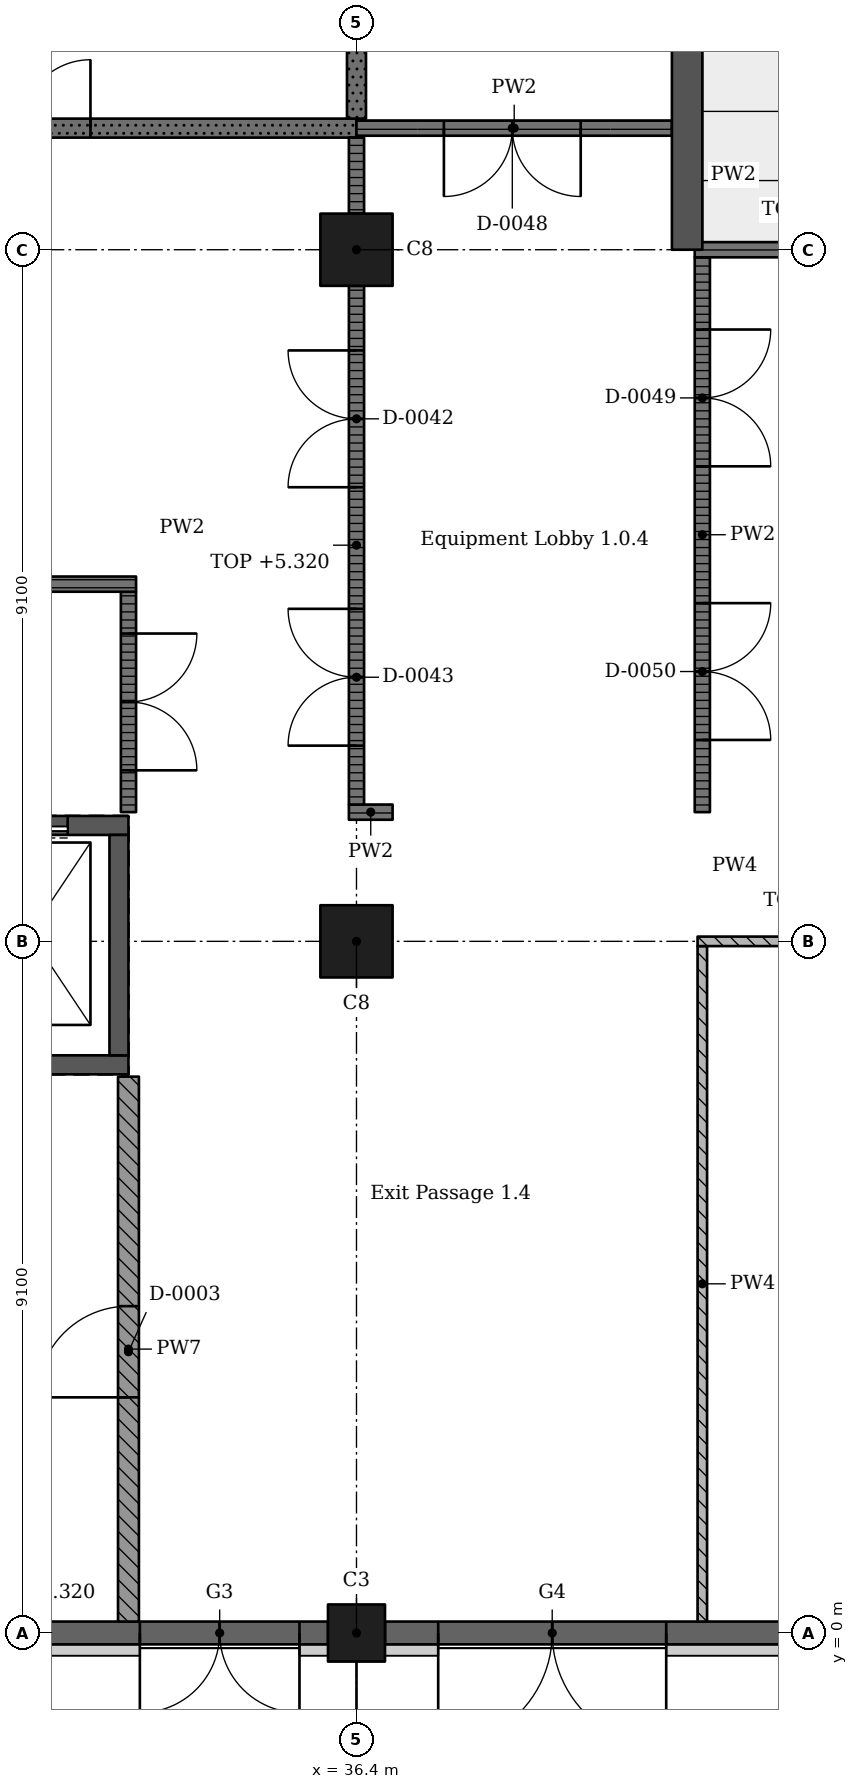
"""IFC4 building model, lengths in metres.
Left out: names, types, materials, properties, quantities, classifications, styles, units other than length and angle.
Written with IfcOpenShell. Run it as: python <this file> out.ifc"""

import sys

from ifc_helpers import new_model, si_unit, direction, frame, frame_2d, origin, origin_2d, place, context, subcontext, project, spatial, rectangle, extrude, element, fill, save


model = new_model("IFC4")
c1 = context("Model", 3, precision=1e-05, world=origin(), true_north=direction((0.0, 1.0)))
c2 = subcontext(c1, "Body", "Model", "MODEL_VIEW")
j1 = project(units=[si_unit("LENGTHUNIT", "METRE"), si_unit("PLANEANGLEUNIT", "RADIAN")], contexts=[c1])
p1 = place(None, origin())
s1 = spatial("IfcSite", under=j1, at=p1, CompositionType="ELEMENT")
p2 = place(p1, origin())
s2 = spatial("IfcBuilding", under=s1, at=p2, CompositionType="ELEMENT")
p3 = place(p2, origin())
s3 = spatial("IfcBuildingStorey", under=s2, at=p3, CompositionType="ELEMENT", Elevation=0.0)
p4 = place(p3, frame((36.4, 0.0, -0.4), z_axis=(0.0, 0.0, 1.0), x_axis=(1.0, 0.0, 0.0)))
e1 = element("IfcColumn", 1, at=p4, inside=s3, PredefinedType="COLUMN", context=c2, shape_type="SweptSolid", body=[
    extrude(rectangle(XDim=0.75, YDim=0.75, at=origin_2d()), origin(), (0.0, 0.0, 1.0), 6.77),
])
for number, where, z_axis, x_axis in (
    (2, (36.4, 9.1, -0.4), (0.0, 0.0, 1.0), (1.0, 0.0, 0.0)),
    (3, (36.4, 18.2, -0.4), (0.0, 0.0, 1.0), (1.0, 0.0, 0.0)),
):
    element("IfcColumn", number, at=place(p3, frame(where, z_axis=z_axis, x_axis=x_axis)), inside=s3, PredefinedType="COLUMN", context=c2, shape_type="SweptSolid", body=[
        extrude(rectangle(XDim=0.95, YDim=0.95, at=origin_2d()), origin(), (0.0, 0.0, 1.0), 6.77),
    ])
p5 = place(p3, frame((40.75, 26.809, -0.4), z_axis=(0.0, 0.0, 1.0), x_axis=(0.0, -1.0, 0.0)))
e4 = element("IfcWall", 4, at=p5, inside=s3, PredefinedType="SHEAR", context=c2, shape_type="SweptSolid", body=[
    extrude(rectangle(XDim=8.609, YDim=0.4, at=frame_2d((4.304, 0.0))), origin(), (0.0, 0.0, 1.0), 6.77),
])
p6 = place(p3, frame((33.4, 7.475, -1.4), z_axis=(0.0, 0.0, 1.0), x_axis=(-1.0, 0.0, 0.0)))
e5 = element("IfcWall", 5, at=p6, inside=s3, PredefinedType="SHEAR", context=c2, shape_type="SweptSolid", body=[
    extrude(rectangle(XDim=2.6, YDim=0.25, at=frame_2d((1.3, 0.0))), origin(), (0.0, 0.0, 1.0), 7.77),
])
p7 = place(p3, frame((33.4, 10.625, -1.4), z_axis=(0.0, 0.0, 1.0), x_axis=(-1.0, 0.0, 0.0)))
e6 = element("IfcWall", 6, at=p7, inside=s3, PredefinedType="SHEAR", context=c2, shape_type="SweptSolid", body=[
    extrude(rectangle(XDim=2.6, YDim=0.25, at=frame_2d((1.3, 0.0))), origin(), (0.0, 0.0, 1.0), 7.77),
])
p8 = place(p7, frame((0.8, 0.0, 1.4)))
e7 = element("IfcOpeningElement", 7, at=p8, cuts=e6, PredefinedType="OPENING", context=c2, shape_type="SweptSolid", body=[
    extrude(rectangle(XDim=1.0, YDim=2.1, at=frame_2d((0.5, 1.05))), frame((0.0, 0.135, 0.0), z_axis=(0.0, -1.0, 0.0), x_axis=(1.0, 0.0, 0.0)), (0.0, 0.0, 1.0), 0.27),
])
p9 = place(p3, frame((33.275, 10.5, -1.4), z_axis=(0.0, 0.0, 1.0), x_axis=(0.0, -1.0, 0.0)))
e8 = element("IfcWall", 8, at=p9, inside=s3, PredefinedType="SHEAR", context=c2, shape_type="SweptSolid", body=[
    extrude(rectangle(XDim=2.9, YDim=0.25, at=frame_2d((1.45, 0.0))), origin(), (0.0, 0.0, 1.0), 7.77),
])
p10 = place(p3, frame((27.65, 0.0, 0.0), z_axis=(0.0, 0.0, 1.0), x_axis=(1.0, 0.0, 0.0)))
e9 = element("IfcWall", 9, at=p10, inside=s3, PredefinedType="SOLIDWALL", context=c2, shape_type="SweptSolid", body=[
    extrude(rectangle(XDim=8.375, YDim=0.3, at=frame_2d((4.188, 0.0))), origin(), (0.0, 0.0, 1.0), 5.32),
])
p11 = place(p10, frame((5.9, 0.0, 0.0)))
e10 = element("IfcOpeningElement", 10, at=p11, cuts=e9, PredefinedType="OPENING", context=c2, shape_type="SweptSolid", body=[
    extrude(rectangle(XDim=2.1, YDim=2.4, at=frame_2d((1.05, 1.2))), frame((0.0, 0.16, 0.0), z_axis=(0.0, -1.0, 0.0), x_axis=(1.0, 0.0, 0.0)), (0.0, 0.0, 1.0), 0.32),
])
p12 = place(p3, frame((36.775, 0.0, 0.0), z_axis=(0.0, 0.0, 1.0), x_axis=(1.0, 0.0, 0.0)))
e11 = element("IfcWall", 11, at=p12, inside=s3, PredefinedType="SOLIDWALL", context=c2, shape_type="SweptSolid", body=[
    extrude(rectangle(XDim=8.375, YDim=0.3, at=frame_2d((4.188, 0.0))), origin(), (0.0, 0.0, 1.0), 5.32),
])
p13 = place(p12, frame((0.7, 0.0, 0.0)))
e12 = element("IfcOpeningElement", 12, at=p13, cuts=e11, PredefinedType="OPENING", context=c2, shape_type="SweptSolid", body=[
    extrude(rectangle(XDim=3.0, YDim=2.4, at=frame_2d((1.5, 1.2))), frame((0.0, 0.16, 0.0), z_axis=(0.0, -1.0, 0.0), x_axis=(1.0, 0.0, 0.0)), (0.0, 0.0, 1.0), 0.32),
])
p14 = place(p3, frame((27.65, 19.8, 0.0), z_axis=(0.0, 0.0, 1.0), x_axis=(1.0, 0.0, 0.0)))
e13 = element("IfcWall", 13, at=p14, inside=s3, PredefinedType="SOLIDWALL", context=c2, shape_type="SweptSolid", body=[
    extrude(rectangle(XDim=8.75, YDim=0.25, at=frame_2d((4.375, 0.0))), origin(), (0.0, 0.0, 1.0), 6.02),
])
p15 = place(p14, frame((3.45, 0.0, 0.0)))
e14 = element("IfcOpeningElement", 14, at=p15, cuts=e13, PredefinedType="OPENING", context=c2, shape_type="SweptSolid", body=[
    extrude(rectangle(XDim=1.8, YDim=2.1, at=frame_2d((0.9, 1.05))), frame((0.0, 0.135, 0.0), z_axis=(0.0, -1.0, 0.0), x_axis=(1.0, 0.0, 0.0)), (0.0, 0.0, 1.0), 0.27),
])
p16 = place(p3, frame((33.4, 0.15, 0.0), z_axis=(0.0, 0.0, 1.0), x_axis=(0.0, 1.0, 0.0)))
e15 = element("IfcWall", 15, at=p16, inside=s3, PredefinedType="SOLIDWALL", context=c2, shape_type="SweptSolid", body=[
    extrude(rectangle(XDim=7.17, YDim=0.275, at=frame_2d((3.585, 0.0))), origin(), (0.0, 0.0, 1.0), 6.02),
])
p17 = place(p16, frame((2.95, 0.0, 0.0)))
e16 = element("IfcOpeningElement", 16, at=p17, cuts=e15, PredefinedType="OPENING", context=c2, shape_type="SweptSolid", body=[
    extrude(rectangle(XDim=1.2, YDim=2.4, at=frame_2d((0.6, 1.2))), frame((0.0, 0.147, 0.0), z_axis=(0.0, -1.0, 0.0), x_axis=(1.0, 0.0, 0.0)), (0.0, 0.0, 1.0), 0.295),
])
p18 = place(p3, frame((33.4, 10.8, 0.0), z_axis=(0.0, 0.0, 1.0), x_axis=(0.0, 1.0, 0.0)))
e17 = element("IfcWall", 17, at=p18, inside=s3, PredefinedType="PARTITIONING", context=c2, shape_type="SweptSolid", body=[
    extrude(rectangle(XDim=2.9, YDim=0.2, at=frame_2d((1.45, 0.0))), origin(), (0.0, 0.0, 1.0), 6.02),
])
p19 = place(p18, frame((0.55, 0.0, 0.0)))
e18 = element("IfcOpeningElement", 18, at=p19, cuts=e17, PredefinedType="OPENING", context=c2, shape_type="SweptSolid", body=[
    extrude(rectangle(XDim=1.8, YDim=2.4, at=frame_2d((0.9, 1.2))), frame((0.0, 0.11, 0.0), z_axis=(0.0, -1.0, 0.0), x_axis=(1.0, 0.0, 0.0)), (0.0, 0.0, 1.0), 0.22),
])
p20 = place(p3, frame((33.5, 13.8, 0.0), z_axis=(0.0, 0.0, 1.0), x_axis=(-1.0, 0.0, 0.0)))
e19 = element("IfcWall", 19, at=p20, inside=s3, PredefinedType="PARTITIONING", context=c2, shape_type="SweptSolid", body=[
    extrude(rectangle(XDim=5.5, YDim=0.2, at=frame_2d((2.75, 0.0))), origin(), (0.0, 0.0, 1.0), 6.02),
])
p21 = place(p20, frame((1.85, 0.0, 0.0)))
e20 = element("IfcOpeningElement", 20, at=p21, cuts=e19, PredefinedType="OPENING", context=c2, shape_type="SweptSolid", body=[
    extrude(rectangle(XDim=1.8, YDim=2.4, at=frame_2d((0.9, 1.2))), frame((0.0, 0.11, 0.0), z_axis=(0.0, -1.0, 0.0), x_axis=(1.0, 0.0, 0.0)), (0.0, 0.0, 1.0), 0.22),
])
p22 = place(p3, frame((36.3, 10.8, 0.0), z_axis=(0.0, 0.0, 1.0), x_axis=(1.0, 0.0, 0.0)))
e21 = element("IfcWall", 21, at=p22, inside=s3, PredefinedType="PARTITIONING", context=c2, shape_type="SweptSolid", body=[
    extrude(rectangle(XDim=0.575, YDim=0.2, at=frame_2d((0.288, 0.0))), origin(), (0.0, 0.0, 1.0), 6.02),
])
p23 = place(p3, frame((36.4, 17.725, 0.0), z_axis=(0.0, 0.0, 1.0), x_axis=(0.0, -1.0, 0.0)))
e22 = element("IfcWall", 22, at=p23, inside=s3, PredefinedType="PARTITIONING", context=c2, shape_type="SweptSolid", body=[
    extrude(rectangle(XDim=6.825, YDim=0.2, at=frame_2d((3.413, 0.0))), origin(), (0.0, 0.0, 1.0), 5.32),
])
p24 = place(p23, frame((0.85, 0.0, 0.0)))
e23 = element("IfcOpeningElement", 23, at=p24, cuts=e22, PredefinedType="OPENING", context=c2, shape_type="SweptSolid", body=[
    extrude(rectangle(XDim=1.8, YDim=2.4, at=frame_2d((0.9, 1.2))), frame((0.0, 0.11, 0.0), z_axis=(0.0, -1.0, 0.0), x_axis=(1.0, 0.0, 0.0)), (0.0, 0.0, 1.0), 0.22),
])
p25 = place(p23, frame((4.25, 0.0, 0.0)))
e24 = element("IfcOpeningElement", 24, at=p25, cuts=e22, PredefinedType="OPENING", context=c2, shape_type="SweptSolid", body=[
    extrude(rectangle(XDim=1.8, YDim=2.4, at=frame_2d((0.9, 1.2))), frame((0.0, 0.11, 0.0), z_axis=(0.0, -1.0, 0.0), x_axis=(1.0, 0.0, 0.0)), (0.0, 0.0, 1.0), 0.22),
])
p26 = place(p3, frame((36.4, 19.675, 0.0), z_axis=(0.0, 0.0, 1.0), x_axis=(0.0, -1.0, 0.0)))
e25 = element("IfcWall", 25, at=p26, inside=s3, PredefinedType="PARTITIONING", context=c2, shape_type="SweptSolid", body=[
    extrude(rectangle(XDim=1.0, YDim=0.2, at=frame_2d((0.5, 0.0))), origin(), (0.0, 0.0, 1.0), 5.32),
])
p27 = place(p3, frame((36.4, 19.8, 0.0), z_axis=(0.0, 0.0, 1.0), x_axis=(1.0, 0.0, 0.0)))
e26 = element("IfcWall", 26, at=p27, inside=s3, PredefinedType="PARTITIONING", context=c2, shape_type="SweptSolid", body=[
    extrude(rectangle(XDim=4.15, YDim=0.2, at=frame_2d((2.075, 0.0))), origin(), (0.0, 0.0, 1.0), 6.02),
])
p28 = place(p27, frame((1.15, 0.0, 0.0)))
e27 = element("IfcOpeningElement", 27, at=p28, cuts=e26, PredefinedType="OPENING", context=c2, shape_type="SweptSolid", body=[
    extrude(rectangle(XDim=1.8, YDim=2.4, at=frame_2d((0.9, 1.2))), frame((0.0, 0.11, 0.0), z_axis=(0.0, -1.0, 0.0), x_axis=(1.0, 0.0, 0.0)), (0.0, 0.0, 1.0), 0.22),
])
p29 = place(p3, frame((36.4, 26.85, 0.0), z_axis=(0.0, 0.0, 1.0), x_axis=(0.0, -1.0, 0.0)))
e28 = element("IfcWall", 28, at=p29, inside=s3, PredefinedType="SOLIDWALL", context=c2, shape_type="SweptSolid", body=[
    extrude(rectangle(XDim=6.925, YDim=0.25, at=frame_2d((3.462, 0.0))), origin(), (0.0, 0.0, 1.0), 5.32),
])
p30 = place(p3, frame((40.85, 18.2, 0.0), z_axis=(0.0, 0.0, 1.0), x_axis=(1.0, 0.0, 0.0)))
e29 = element("IfcWall", 29, at=p30, inside=s3, PredefinedType="PARTITIONING", context=c2, shape_type="SweptSolid", body=[
    extrude(rectangle(XDim=4.35, YDim=0.2, at=frame_2d((2.175, 0.0))), origin(), (0.0, 0.0, 1.0), 5.02),
])
p31 = place(p3, frame((40.95, 9.038, 0.0), z_axis=(0.0, 0.0, 1.0), x_axis=(0.0, -1.0, 0.0)))
e30 = element("IfcWall", 30, at=p31, inside=s3, PredefinedType="PARTITIONING", context=c2, shape_type="SweptSolid", body=[
    extrude(rectangle(XDim=8.888, YDim=0.125, at=frame_2d((4.444, 0.0))), origin(), (0.0, 0.0, 1.0), 6.02),
])
p32 = place(p3, frame((40.95, 18.1, 0.0), z_axis=(0.0, 0.0, 1.0), x_axis=(0.0, -1.0, 0.0)))
e31 = element("IfcWall", 31, at=p32, inside=s3, PredefinedType="PARTITIONING", context=c2, shape_type="SweptSolid", body=[
    extrude(rectangle(XDim=7.3, YDim=0.2, at=frame_2d((3.65, 0.0))), origin(), (0.0, 0.0, 1.0), 6.02),
])
p33 = place(p32, frame((0.95, 0.0, 0.0)))
e32 = element("IfcOpeningElement", 32, at=p33, cuts=e31, PredefinedType="OPENING", context=c2, shape_type="SweptSolid", body=[
    extrude(rectangle(XDim=1.8, YDim=2.4, at=frame_2d((0.9, 1.2))), frame((0.0, 0.11, 0.0), z_axis=(0.0, -1.0, 0.0), x_axis=(1.0, 0.0, 0.0)), (0.0, 0.0, 1.0), 0.22),
])
p34 = place(p32, frame((4.55, 0.0, 0.0)))
e33 = element("IfcOpeningElement", 33, at=p34, cuts=e31, PredefinedType="OPENING", context=c2, shape_type="SweptSolid", body=[
    extrude(rectangle(XDim=1.8, YDim=2.4, at=frame_2d((0.9, 1.2))), frame((0.0, 0.11, 0.0), z_axis=(0.0, -1.0, 0.0), x_axis=(1.0, 0.0, 0.0)), (0.0, 0.0, 1.0), 0.22),
])
p35 = place(p3, frame((44.95, 9.1, 0.0), z_axis=(0.0, 0.0, 1.0), x_axis=(-1.0, 0.0, 0.0)))
e34 = element("IfcWall", 34, at=p35, inside=s3, PredefinedType="PARTITIONING", context=c2, shape_type="SweptSolid", body=[
    extrude(rectangle(XDim=4.062, YDim=0.125, at=frame_2d((2.031, 0.0))), origin(), (0.0, 0.0, 1.0), 5.32),
])
p36 = place(p11, frame((2.1, 0.0, 0.0), z_axis=(0.0, 0.0, 1.0), x_axis=(-1.0, 0.0, 0.0)))
e35 = element("IfcDoor", 35, at=p36, inside=s3, OperationType="DOUBLE_DOOR_SINGLE_SWING", PredefinedType="DOOR", context=c2, shape_type="SweptSolid", body=[
    extrude(rectangle(XDim=2.1, YDim=2.4, at=frame_2d((1.05, 1.2))), frame((0.0, 0.025, 0.0), z_axis=(0.0, -1.0, 0.0), x_axis=(1.0, 0.0, 0.0)), (0.0, 0.0, 1.0), 0.05),
])
fill(e10, e35)
p37 = place(p13, frame((3.0, 0.0, 0.0), z_axis=(0.0, 0.0, 1.0), x_axis=(-1.0, 0.0, 0.0)))
e36 = element("IfcDoor", 36, at=p37, inside=s3, OperationType="DOUBLE_DOOR_SINGLE_SWING", PredefinedType="DOOR", context=c2, shape_type="SweptSolid", body=[
    extrude(rectangle(XDim=3.0, YDim=2.4, at=frame_2d((1.5, 1.2))), frame((0.0, 0.025, 0.0), z_axis=(0.0, -1.0, 0.0), x_axis=(1.0, 0.0, 0.0)), (0.0, 0.0, 1.0), 0.05),
])
fill(e12, e36)
p38 = place(p17, origin())
e37 = element("IfcDoor", 37, at=p38, inside=s3, OperationType="SINGLE_SWING_RIGHT", PredefinedType="DOOR", context=c2, shape_type="SweptSolid", body=[
    extrude(rectangle(XDim=1.2, YDim=2.4, at=frame_2d((0.6, 1.2))), frame((0.0, 0.025, 0.0), z_axis=(0.0, -1.0, 0.0), x_axis=(1.0, 0.0, 0.0)), (0.0, 0.0, 1.0), 0.05),
])
fill(e16, e37)
p39 = place(p15, origin())
e38 = element("IfcDoor", 38, at=p39, inside=s3, OperationType="DOUBLE_DOOR_SINGLE_SWING", PredefinedType="DOOR", context=c2, shape_type="SweptSolid", body=[
    extrude(rectangle(XDim=1.8, YDim=2.1, at=frame_2d((0.9, 1.05))), frame((0.0, 0.025, 0.0), z_axis=(0.0, -1.0, 0.0), x_axis=(1.0, 0.0, 0.0)), (0.0, 0.0, 1.0), 0.05),
])
fill(e14, e38)
p40 = place(p24, origin())
e39 = element("IfcDoor", 39, at=p40, inside=s3, OperationType="DOUBLE_DOOR_SINGLE_SWING", PredefinedType="DOOR", context=c2, shape_type="SweptSolid", body=[
    extrude(rectangle(XDim=1.8, YDim=2.4, at=frame_2d((0.9, 1.2))), frame((0.0, 0.025, 0.0), z_axis=(0.0, -1.0, 0.0), x_axis=(1.0, 0.0, 0.0)), (0.0, 0.0, 1.0), 0.05),
])
fill(e23, e39)
p41 = place(p25, origin())
e40 = element("IfcDoor", 40, at=p41, inside=s3, OperationType="DOUBLE_DOOR_SINGLE_SWING", PredefinedType="DOOR", context=c2, shape_type="SweptSolid", body=[
    extrude(rectangle(XDim=1.8, YDim=2.4, at=frame_2d((0.9, 1.2))), frame((0.0, 0.025, 0.0), z_axis=(0.0, -1.0, 0.0), x_axis=(1.0, 0.0, 0.0)), (0.0, 0.0, 1.0), 0.05),
])
fill(e24, e40)
p42 = place(p19, origin())
e41 = element("IfcDoor", 41, at=p42, inside=s3, OperationType="DOUBLE_DOOR_SINGLE_SWING", PredefinedType="DOOR", context=c2, shape_type="SweptSolid", body=[
    extrude(rectangle(XDim=1.8, YDim=2.4, at=frame_2d((0.9, 1.2))), frame((0.0, 0.025, 0.0), z_axis=(0.0, -1.0, 0.0), x_axis=(1.0, 0.0, 0.0)), (0.0, 0.0, 1.0), 0.05),
])
fill(e18, e41)
p43 = place(p28, origin())
e42 = element("IfcDoor", 42, at=p43, inside=s3, OperationType="DOUBLE_DOOR_SINGLE_SWING", PredefinedType="DOOR", context=c2, shape_type="SweptSolid", body=[
    extrude(rectangle(XDim=1.8, YDim=2.4, at=frame_2d((0.9, 1.2))), frame((0.0, 0.025, 0.0), z_axis=(0.0, -1.0, 0.0), x_axis=(1.0, 0.0, 0.0)), (0.0, 0.0, 1.0), 0.05),
])
fill(e27, e42)
p44 = place(p33, origin())
e43 = element("IfcDoor", 43, at=p44, inside=s3, OperationType="DOUBLE_DOOR_SINGLE_SWING", PredefinedType="DOOR", context=c2, shape_type="SweptSolid", body=[
    extrude(rectangle(XDim=1.8, YDim=2.4, at=frame_2d((0.9, 1.2))), frame((0.0, 0.025, 0.0), z_axis=(0.0, -1.0, 0.0), x_axis=(1.0, 0.0, 0.0)), (0.0, 0.0, 1.0), 0.05),
])
fill(e32, e43)
p45 = place(p34, origin())
e44 = element("IfcDoor", 44, at=p45, inside=s3, OperationType="DOUBLE_DOOR_SINGLE_SWING", PredefinedType="DOOR", context=c2, shape_type="SweptSolid", body=[
    extrude(rectangle(XDim=1.8, YDim=2.4, at=frame_2d((0.9, 1.2))), frame((0.0, 0.025, 0.0), z_axis=(0.0, -1.0, 0.0), x_axis=(1.0, 0.0, 0.0)), (0.0, 0.0, 1.0), 0.05),
])
fill(e33, e44)
p46 = place(p8, origin())
e45 = element("IfcDoor", 45, at=p46, inside=s3, OperationType="DOUBLE_DOOR_SLIDING", PredefinedType="DOOR", context=c2, shape_type="SweptSolid", body=[
    extrude(rectangle(XDim=1.0, YDim=2.1, at=frame_2d((0.5, 1.05))), frame((0.0, 0.025, 0.0), z_axis=(0.0, -1.0, 0.0), x_axis=(1.0, 0.0, 0.0)), (0.0, 0.0, 1.0), 0.05),
])
fill(e7, e45)
save(model, sys.argv[1])
